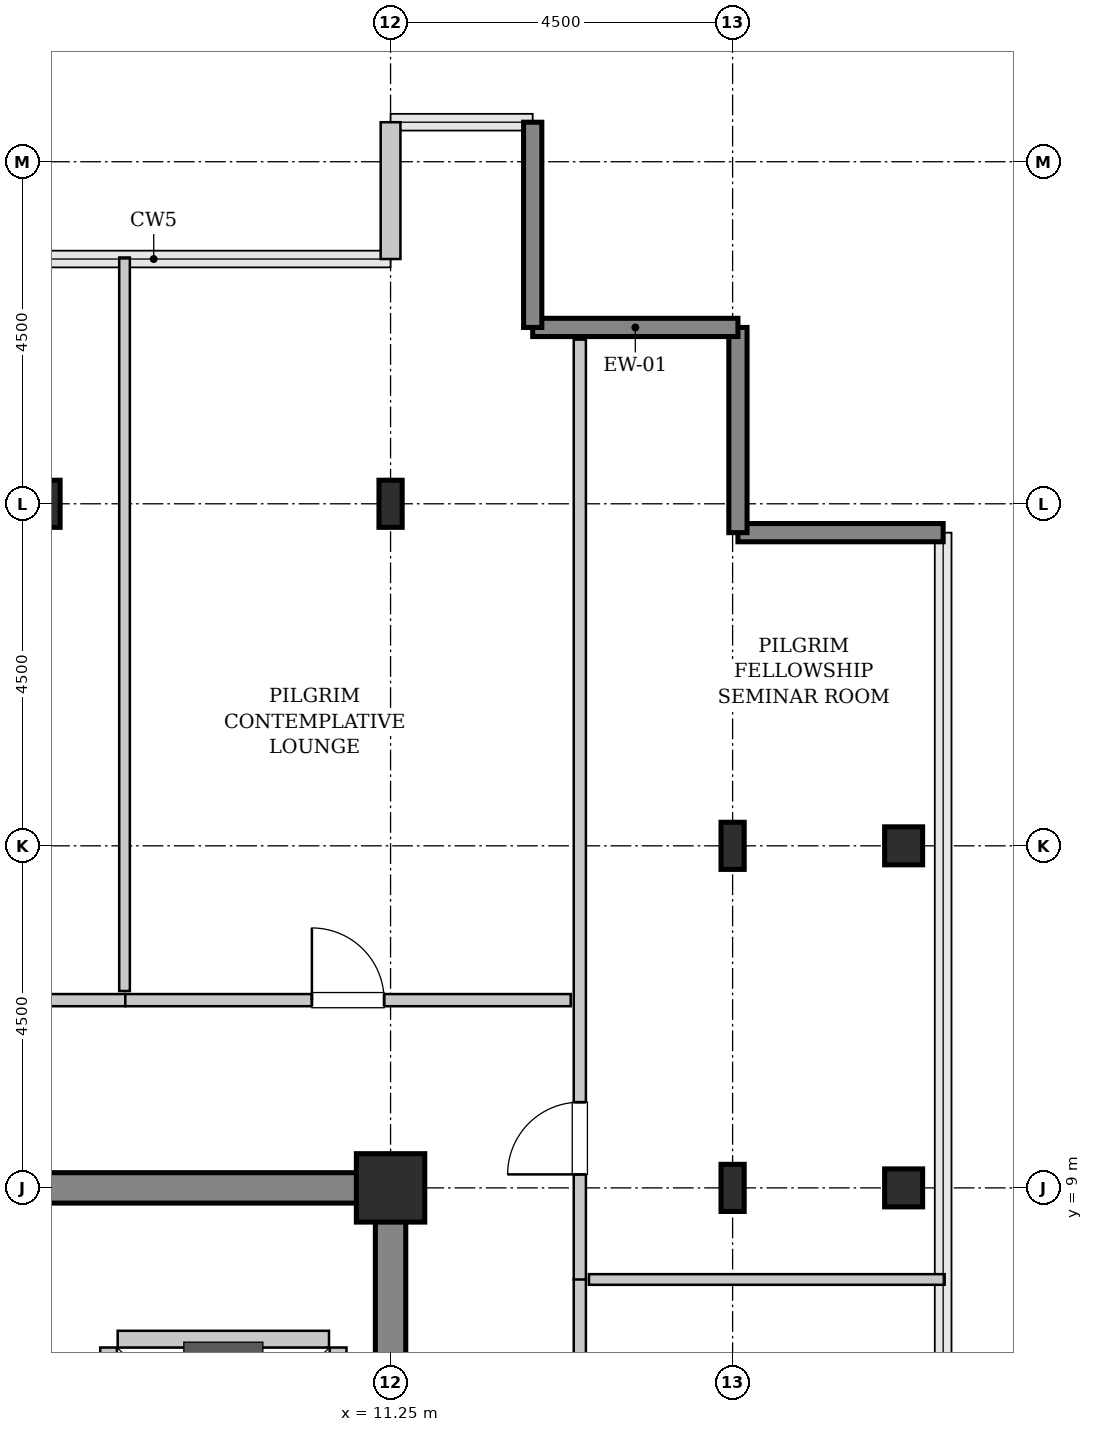
"""IFC4 building model, lengths in metres.
Left out: names, types, materials, properties, quantities, classifications, styles, units other than length and angle.
Written with IfcOpenShell. Run it as: python <this file> out.ifc"""

import sys

from ifc_helpers import new_model, si_unit, direction, frame, frame_2d, origin, origin_2d, place, context, subcontext, project, spatial, rectangle, hollow_rectangle, i_section, extrude, source, transform, mapped, element, fill, save


model = new_model("IFC4")
c1 = context("Model", 3, precision=1e-05, world=origin(), true_north=direction((0.0, 1.0)))
c2 = subcontext(c1, "Body", "Model", "MODEL_VIEW")
j1 = project(units=[si_unit("LENGTHUNIT", "METRE"), si_unit("PLANEANGLEUNIT", "RADIAN")], contexts=[c1])
p1 = place(None, origin())
s1 = spatial("IfcSite", under=j1, at=p1, CompositionType="ELEMENT")
p2 = place(p1, origin())
s2 = spatial("IfcBuilding", under=s1, at=p2, CompositionType="ELEMENT")
p3 = place(p2, frame((0.0, 0.0, 330.0)))
s3 = spatial("IfcBuildingStorey", under=s2, at=p3, CompositionType="ELEMENT", Elevation=330.0)
m1 = source(origin(), c2, "Body", "SweptSolid", [
    extrude(rectangle(XDim=9.9, YDim=0.4, at=frame_2d((4.95, 0.0))), origin(), (0.0, 0.0, 1.0), 3.8),
])
p4 = place(p3, frame((1.55, 9.0, 0.0), z_axis=(0.0, 0.0, 1.0), x_axis=(1.0, 0.0, 0.0)))
e1 = element("IfcWall", 1, at=p4, inside=s3, PredefinedType="SHEAR", context=c2, shape_type="MappedRepresentation", body=[
    mapped(m1, transform((0.0, 0.0, 0.0), x_axis=(1.0, 0.0, 0.0), y_axis=(0.0, 1.0, 0.0), z_axis=(0.0, 0.0, 1.0), scale=1.0)),
])
m2 = source(origin(), c2, "Body", "SweptSolid", [
    extrude(rectangle(XDim=7.45, YDim=0.4, at=frame_2d((3.725, 0.0))), origin(), (0.0, 0.0, 1.0), 3.8),
])
p5 = place(p3, frame((11.25, 1.35, 0.0), z_axis=(0.0, 0.0, 1.0), x_axis=(0.0, 1.0, 0.0)))
e2 = element("IfcWall", 2, at=p5, inside=s3, PredefinedType="SHEAR", context=c2, shape_type="MappedRepresentation", body=[
    mapped(m2, transform((0.0, 0.0, 0.0), x_axis=(1.0, 0.0, 0.0), y_axis=(0.0, 1.0, 0.0), z_axis=(0.0, 0.0, 1.0), scale=1.0)),
])
m3 = source(origin(), c2, "Body", "SweptSolid", [
    extrude(i_section(OverallWidth=0.305, OverallDepth=0.62, WebThickness=0.021, FlangeThickness=0.04, FilletRadius=0.027, at=origin_2d()), origin(), (0.0, 0.0, 1.0), 3.8),
])
p6 = place(p3, frame((6.75, 18.0, 0.0), z_axis=(0.0, 0.0, 1.0), x_axis=(1.0, 0.0, 0.0)))
e3 = element("IfcColumn", 3, at=p6, inside=s3, PredefinedType="COLUMN", context=c2, shape_type="MappedRepresentation", body=[
    mapped(m3, transform((0.0, 0.0, 0.0), x_axis=(1.0, 0.0, 0.0), y_axis=(0.0, 1.0, 0.0), z_axis=(0.0, 0.0, 1.0), scale=1.0)),
])
m4 = source(origin(), c2, "Body", "SweptSolid", [
    extrude(rectangle(XDim=0.9, YDim=0.9, at=origin_2d()), origin(), (0.0, 0.0, 1.0), 3.8),
])
p7 = place(p3, frame((11.25, 9.0, 0.0), z_axis=(0.0, 0.0, 1.0), x_axis=(1.0, 0.0, 0.0)))
e4 = element("IfcColumn", 4, at=p7, inside=s3, PredefinedType="COLUMN", context=c2, shape_type="MappedRepresentation", body=[
    mapped(m4, transform((0.0, 0.0, 0.0), x_axis=(1.0, 0.0, 0.0), y_axis=(0.0, 1.0, 0.0), z_axis=(0.0, 0.0, 1.0), scale=1.0)),
])
for number, where, z_axis, x_axis in (
    (5, (11.25, 18.0, 0.0), (0.0, 0.0, 1.0), (1.0, 0.0, 0.0)),
    (6, (15.75, 9.0, 0.0), (0.0, 0.0, 1.0), (1.0, 0.0, 0.0)),
    (7, (15.75, 13.5, 0.0), (0.0, 0.0, 1.0), (1.0, 0.0, 0.0)),
):
    element("IfcColumn", number, at=place(p3, frame(where, z_axis=z_axis, x_axis=x_axis)), inside=s3, PredefinedType="COLUMN", context=c2, shape_type="MappedRepresentation", body=[
        mapped(m3, transform((0.0, 0.0, 0.0), x_axis=(1.0, 0.0, 0.0), y_axis=(0.0, 1.0, 0.0), z_axis=(0.0, 0.0, 1.0), scale=1.0)),
    ])
m5 = source(origin(), c2, "Body", "SweptSolid", [
    extrude(hollow_rectangle(XDim=0.5, YDim=0.5, WallThickness=0.025, InnerFilletRadius=0.025, OuterFilletRadius=0.05, at=origin_2d()), origin(), (0.0, 0.0, 1.0), 3.8),
])
for number, where, z_axis, x_axis in (
    (8, (18.0, 9.0, 0.0), (0.0, 0.0, 1.0), (1.0, 0.0, 0.0)),
    (9, (18.0, 13.5, 0.0), (0.0, 0.0, 1.0), (1.0, 0.0, 0.0)),
):
    element("IfcColumn", number, at=place(p3, frame(where, z_axis=z_axis, x_axis=x_axis)), inside=s3, PredefinedType="COLUMN", context=c2, shape_type="MappedRepresentation", body=[
        mapped(m5, transform((0.0, 0.0, 0.0), x_axis=(1.0, 0.0, 0.0), y_axis=(0.0, 1.0, 0.0), z_axis=(0.0, 0.0, 1.0), scale=1.0)),
    ])
m6 = source(origin(), c2, "Body", "SweptSolid", [
    extrude(rectangle(XDim=2.7, YDim=0.24, at=frame_2d((1.35, 0.0))), origin(), (0.0, 0.0, 1.0), 3.55),
])
for number, where, z_axis, x_axis in (
    (10, (18.52, 17.62, 0.0), (0.0, 0.0, 1.0), (-1.0, 0.0, 0.0)),
    (11, (15.82, 17.62, 0.0), (0.0, 0.0, 1.0), (0.0, 1.0, 0.0)),
    (12, (15.82, 20.32, 0.0), (0.0, 0.0, 1.0), (-1.0, 0.0, 0.0)),
    (13, (13.12, 20.32, 0.0), (0.0, 0.0, 1.0), (0.0, 1.0, 0.0)),
):
    element("IfcWall", number, at=place(p3, frame(where, z_axis=z_axis, x_axis=x_axis)), inside=s3, PredefinedType="SHEAR", context=c2, shape_type="MappedRepresentation", body=[
        mapped(m6, transform((0.0, 0.0, 0.0), x_axis=(1.0, 0.0, 0.0), y_axis=(0.0, 1.0, 0.0), z_axis=(0.0, 0.0, 1.0), scale=1.0)),
    ])
m7 = source(origin(), c2, "Body", "SweptSolid", [
    extrude(rectangle(XDim=1.8, YDim=0.26, at=frame_2d((0.9, 0.0))), origin(), (0.0, 0.0, 1.0), 3.55),
])
p8 = place(p3, frame((11.25, 23.02, 0.0), z_axis=(0.0, 0.0, 1.0), x_axis=(0.0, -1.0, 0.0)))
e14 = element("IfcWall", 14, at=p8, inside=s3, PredefinedType="SOLIDWALL", context=c2, shape_type="MappedRepresentation", body=[
    mapped(m7, transform((0.0, 0.0, 0.0), x_axis=(1.0, 0.0, 0.0), y_axis=(0.0, 1.0, 0.0), z_axis=(0.0, 0.0, 1.0), scale=1.0)),
])
m8 = source(origin(), c2, "Body", "SweptSolid", [
    extrude(rectangle(XDim=5.45, YDim=0.22, at=frame_2d((2.725, 0.0))), origin(), (0.0, 0.0, 1.0), 3.535),
])
p9 = place(p3, frame((7.54, 6.9, 0.0), z_axis=(0.0, 0.0, 1.0), x_axis=(0.0, -1.0, 0.0)))
e15 = element("IfcWall", 15, at=p9, inside=s3, PredefinedType="SOLIDWALL", context=c2, shape_type="MappedRepresentation", body=[
    mapped(m8, transform((0.0, 0.0, 0.0), x_axis=(1.0, 0.0, 0.0), y_axis=(0.0, 1.0, 0.0), z_axis=(0.0, 0.0, 1.0), scale=1.0)),
])
p10 = place(p9, frame((3.5, 0.0, 0.0)))
e16 = element("IfcOpeningElement", 16, at=p10, cuts=e15, PredefinedType="OPENING", context=c2, shape_type="SweptSolid", body=[
    extrude(rectangle(XDim=1.3, YDim=2.3, at=frame_2d((0.65, 1.15))), frame((0.0, 0.12, 0.0), z_axis=(0.0, -1.0, 0.0), x_axis=(1.0, 0.0, 0.0)), (0.0, 0.0, 1.0), 0.24),
])
p11 = place(p9, frame((0.65, 0.0, 0.0)))
e17 = element("IfcOpeningElement", 17, at=p11, cuts=e15, PredefinedType="OPENING", context=c2, shape_type="SweptSolid", body=[
    extrude(rectangle(XDim=1.3, YDim=2.3, at=frame_2d((0.65, 1.15))), frame((0.0, 0.12, 0.0), z_axis=(0.0, -1.0, 0.0), x_axis=(1.0, 0.0, 0.0)), (0.0, 0.0, 1.0), 0.24),
])
p12 = place(p3, frame((10.56, 1.45, 0.0), z_axis=(0.0, 0.0, 1.0), x_axis=(0.0, 1.0, 0.0)))
e18 = element("IfcWall", 18, at=p12, inside=s3, PredefinedType="SOLIDWALL", context=c2, shape_type="MappedRepresentation", body=[
    mapped(m8, transform((0.0, 0.0, 0.0), x_axis=(1.0, 0.0, 0.0), y_axis=(0.0, 1.0, 0.0), z_axis=(0.0, 0.0, 1.0), scale=1.0)),
])
m9 = source(origin(), c2, "Body", "SweptSolid", [
    extrude(rectangle(XDim=2.78, YDim=0.22, at=frame_2d((1.39, 0.0))), origin(), (0.0, 0.0, 1.0), 3.535),
])
p13 = place(p3, frame((10.44, 7.01, 0.0), z_axis=(0.0, 0.0, 1.0), x_axis=(-1.0, 0.0, 0.0)))
e19 = element("IfcWall", 19, at=p13, inside=s3, PredefinedType="SOLIDWALL", context=c2, shape_type="MappedRepresentation", body=[
    mapped(m9, transform((0.0, 0.0, 0.0), x_axis=(1.0, 0.0, 0.0), y_axis=(0.0, 1.0, 0.0), z_axis=(0.0, 0.0, 1.0), scale=1.0)),
])
m10 = source(origin(), c2, "Body", "SweptSolid", [
    extrude(rectangle(XDim=15.61, YDim=0.16, at=frame_2d((7.805, 0.0))), origin(), (0.0, 0.0, 1.0), 3.535),
])
p14 = place(p3, frame((13.74, -7.805, 0.0), z_axis=(0.0, 0.0, 1.0), x_axis=(0.0, 1.0, 0.0)))
e20 = element("IfcWall", 20, at=p14, inside=s3, PredefinedType="PARTITIONING", context=c2, shape_type="MappedRepresentation", body=[
    mapped(m10, transform((0.0, 0.0, 0.0), x_axis=(1.0, 0.0, 0.0), y_axis=(0.0, 1.0, 0.0), z_axis=(0.0, 0.0, 1.0), scale=1.0)),
])
p15 = place(p14, frame((7.33, 0.0, 0.0)))
e21 = element("IfcOpeningElement", 21, at=p15, cuts=e20, PredefinedType="OPENING", context=c2, shape_type="SweptSolid", body=[
    extrude(rectangle(XDim=0.95, YDim=2.1, at=frame_2d((0.475, 1.05))), frame((0.0, 0.09, 0.0), z_axis=(0.0, -1.0, 0.0), x_axis=(1.0, 0.0, 0.0)), (0.0, 0.0, 1.0), 0.18),
])
m11 = source(origin(), c2, "Body", "SweptSolid", [
    extrude(rectangle(XDim=4.68, YDim=0.14, at=frame_2d((2.34, 0.0))), origin(), (0.0, 0.0, 1.0), 3.535),
])
p16 = place(p3, frame((13.86, 7.795, 0.0), z_axis=(0.0, 0.0, 1.0), x_axis=(1.0, 0.0, 0.0)))
e22 = element("IfcWall", 22, at=p16, inside=s3, PredefinedType="PARTITIONING", context=c2, shape_type="MappedRepresentation", body=[
    mapped(m11, transform((0.0, 0.0, 0.0), x_axis=(1.0, 0.0, 0.0), y_axis=(0.0, 1.0, 0.0), z_axis=(0.0, 0.0, 1.0), scale=1.0)),
])
m12 = source(origin(), c2, "Body", "SweptSolid", [
    extrude(rectangle(XDim=12.365, YDim=0.16, at=frame_2d((6.183, 0.0))), origin(), (0.0, 0.0, 1.0), 3.535),
])
p17 = place(p3, frame((13.74, 7.795, 0.0), z_axis=(0.0, 0.0, 1.0), x_axis=(0.0, 1.0, 0.0)))
e23 = element("IfcWall", 23, at=p17, inside=s3, PredefinedType="PARTITIONING", context=c2, shape_type="MappedRepresentation", body=[
    mapped(m12, transform((0.0, 0.0, 0.0), x_axis=(1.0, 0.0, 0.0), y_axis=(0.0, 1.0, 0.0), z_axis=(0.0, 0.0, 1.0), scale=1.0)),
])
p18 = place(p17, frame((1.383, 0.0, 0.0)))
e24 = element("IfcOpeningElement", 24, at=p18, cuts=e23, PredefinedType="OPENING", context=c2, shape_type="SweptSolid", body=[
    extrude(rectangle(XDim=0.95, YDim=2.1, at=frame_2d((0.475, 1.05))), frame((0.0, 0.09, 0.0), z_axis=(0.0, -1.0, 0.0), x_axis=(1.0, 0.0, 0.0)), (0.0, 0.0, 1.0), 0.18),
])
m13 = source(origin(), c2, "Body", "SweptSolid", [
    extrude(rectangle(XDim=5.965, YDim=0.16, at=frame_2d((2.982, 0.0))), origin(), (0.0, 0.0, 1.0), 3.535),
])
p19 = place(p3, frame((1.795, 11.47, 0.0), z_axis=(0.0, 0.0, 1.0), x_axis=(1.0, 0.0, 0.0)))
e25 = element("IfcWall", 25, at=p19, inside=s3, PredefinedType="PARTITIONING", context=c2, shape_type="MappedRepresentation", body=[
    mapped(m13, transform((0.0, 0.0, 0.0), x_axis=(1.0, 0.0, 0.0), y_axis=(0.0, 1.0, 0.0), z_axis=(0.0, 0.0, 1.0), scale=1.0)),
])
p20 = place(p19, frame((2.508, 0.0, 0.0)))
e26 = element("IfcOpeningElement", 26, at=p20, cuts=e25, PredefinedType="OPENING", context=c2, shape_type="SweptSolid", body=[
    extrude(rectangle(XDim=0.95, YDim=2.1, at=frame_2d((0.475, 1.05))), frame((0.0, 0.09, 0.0), z_axis=(0.0, -1.0, 0.0), x_axis=(1.0, 0.0, 0.0)), (0.0, 0.0, 1.0), 0.18),
])
m14 = source(origin(), c2, "Body", "SweptSolid", [
    extrude(rectangle(XDim=9.65, YDim=0.14, at=frame_2d((4.825, 0.0))), origin(), (0.0, 0.0, 1.0), 3.535),
])
p21 = place(p3, frame((7.75, 11.59, 0.0), z_axis=(0.0, 0.0, 1.0), x_axis=(0.0, 1.0, 0.0)))
e27 = element("IfcWall", 27, at=p21, inside=s3, PredefinedType="PARTITIONING", context=c2, shape_type="MappedRepresentation", body=[
    mapped(m14, transform((0.0, 0.0, 0.0), x_axis=(1.0, 0.0, 0.0), y_axis=(0.0, 1.0, 0.0), z_axis=(0.0, 0.0, 1.0), scale=1.0)),
])
m15 = source(origin(), c2, "Body", "SweptSolid", [
    extrude(rectangle(XDim=5.86, YDim=0.16, at=frame_2d((2.93, 0.0))), origin(), (0.0, 0.0, 1.0), 3.535),
])
p22 = place(p3, frame((7.76, 11.47, 0.0), z_axis=(0.0, 0.0, 1.0), x_axis=(1.0, 0.0, 0.0)))
e28 = element("IfcWall", 28, at=p22, inside=s3, PredefinedType="PARTITIONING", context=c2, shape_type="MappedRepresentation", body=[
    mapped(m15, transform((0.0, 0.0, 0.0), x_axis=(1.0, 0.0, 0.0), y_axis=(0.0, 1.0, 0.0), z_axis=(0.0, 0.0, 1.0), scale=1.0)),
])
p23 = place(p22, frame((2.455, 0.0, 0.0)))
e29 = element("IfcOpeningElement", 29, at=p23, cuts=e28, PredefinedType="OPENING", context=c2, shape_type="SweptSolid", body=[
    extrude(rectangle(XDim=0.95, YDim=2.1, at=frame_2d((0.475, 1.05))), frame((0.0, 0.09, 0.0), z_axis=(0.0, -1.0, 0.0), x_axis=(1.0, 0.0, 0.0)), (0.0, 0.0, 1.0), 0.18),
])
m16 = source(origin(), c2, "Body", "SweptSolid", [
    extrude(rectangle(XDim=0.95, YDim=2.1, at=frame_2d((0.475, 1.05))), frame((0.0, 0.025, 0.0), z_axis=(0.0, -1.0, 0.0), x_axis=(1.0, 0.0, 0.0)), (0.0, 0.0, 1.0), 0.05),
])
p24 = place(p18, origin())
e30 = element("IfcDoor", 30, at=p24, inside=s3, OperationType="SINGLE_SWING_LEFT", PredefinedType="DOOR", context=c2, shape_type="MappedRepresentation", body=[
    mapped(m16, transform((0.0, 0.0, 0.0), x_axis=(1.0, 0.0, 0.0), y_axis=(0.0, 1.0, 0.0), z_axis=(0.0, 0.0, 1.0), scale=1.0)),
])
fill(e24, e30)
p25 = place(p23, origin())
e31 = element("IfcDoor", 31, at=p25, inside=s3, OperationType="SINGLE_SWING_LEFT", PredefinedType="DOOR", context=c2, shape_type="MappedRepresentation", body=[
    mapped(m16, transform((0.0, 0.0, 0.0), x_axis=(1.0, 0.0, 0.0), y_axis=(0.0, 1.0, 0.0), z_axis=(0.0, 0.0, 1.0), scale=1.0)),
])
fill(e29, e31)
save(model, sys.argv[1])
